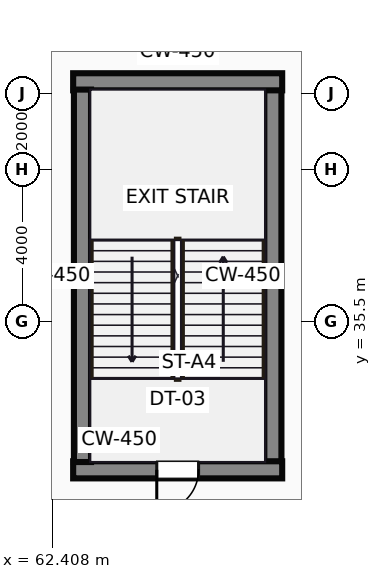
"""IFC4 building model, lengths in metres.
Left out: names, types, materials, properties, quantities, classifications, styles, units other than length and angle.
Written with IfcOpenShell. Run it as: python <this file> out.ifc"""

import sys

from ifc_helpers import new_model, si_unit, direction, frame, frame_2d, origin, place, context, subcontext, project, spatial, rectangle, extrude, source, transform, mapped, element, fill, save


model = new_model("IFC4")
c1 = context("Model", 3, precision=1e-05, world=origin(), true_north=direction((0.0, 1.0)))
c2 = subcontext(c1, "Body", "Model", "MODEL_VIEW")
j1 = project(units=[si_unit("LENGTHUNIT", "METRE"), si_unit("PLANEANGLEUNIT", "RADIAN")], contexts=[c1])
p1 = place(None, origin())
s1 = spatial("IfcSite", under=j1, at=p1, CompositionType="ELEMENT")
p2 = place(p1, origin())
s2 = spatial("IfcBuilding", under=s1, at=p2, CompositionType="ELEMENT")
p3 = place(p2, frame((0.0, 0.0, 11.0)))
s3 = spatial("IfcBuildingStorey", under=s2, at=p3, CompositionType="ELEMENT", Elevation=11.0)
m1 = source(origin(), c2, "Body", "SweptSolid", [
    extrude(rectangle(XDim=5.5, YDim=0.45, at=frame_2d((2.75, 0.0))), origin(), (0.0, 0.0, 1.0), 5.0),
])
p4 = place(p3, frame((62.95, 31.595, 0.0), z_axis=(0.0, 0.0, 1.0), x_axis=(1.0, 0.0, 0.0)))
e1 = element("IfcWall", 1, at=p4, inside=s3, PredefinedType="SHEAR", context=c2, shape_type="MappedRepresentation", body=[
    mapped(m1, transform((0.0, 0.0, 0.0))),
])
p5 = place(p4, frame((2.2, 0.0, 0.0)))
e2 = element("IfcOpeningElement", 2, at=p5, cuts=e1, PredefinedType="OPENING", context=c2, shape_type="SweptSolid", body=[
    extrude(rectangle(XDim=1.1, YDim=2.15, at=frame_2d((0.55, 1.075))), frame((0.0, 0.235, 0.0), z_axis=(0.0, -1.0, 0.0), x_axis=(1.0, 0.0, 0.0)), (0.0, 0.0, 1.0), 0.47),
])
m2 = source(origin(), c2, "Body", "SweptSolid", [
    extrude(rectangle(XDim=9.8, YDim=0.45, at=frame_2d((4.9, 0.0))), origin(), (0.0, 0.0, 1.0), 5.0),
])
for number, where, z_axis, x_axis in (
    (3, (63.195, 31.8, 0.0), (0.0, 0.0, 1.0), (0.0, 1.0, 0.0)),
    (4, (68.205, 31.8, 0.0), (0.0, 0.0, 1.0), (0.0, 1.0, 0.0)),
):
    element("IfcWall", number, at=place(p3, frame(where, z_axis=z_axis, x_axis=x_axis)), inside=s3, PredefinedType="SHEAR", context=c2, shape_type="MappedRepresentation", body=[
        mapped(m2, transform((0.0, 0.0, 0.0))),
    ])
p6 = place(p3, frame((62.95, 41.805, 0.0), z_axis=(0.0, 0.0, 1.0), x_axis=(1.0, 0.0, 0.0)))
e5 = element("IfcWall", 5, at=p6, inside=s3, PredefinedType="SHEAR", context=c2, shape_type="MappedRepresentation", body=[
    mapped(m1, transform((0.0, 0.0, 0.0))),
])
m3 = source(origin(), c2, "Body", "SweptSolid", [
    extrude(rectangle(XDim=1.1, YDim=2.15, at=frame_2d((0.55, 1.075))), frame((0.0, 0.025, 0.0), z_axis=(0.0, -1.0, 0.0), x_axis=(1.0, 0.0, 0.0)), (0.0, 0.0, 1.0), 0.05),
])
p7 = place(p5, origin())
e6 = element("IfcDoor", 6, at=p7, inside=s3, OperationType="SINGLE_SWING_LEFT", PredefinedType="DOOR", context=c2, shape_type="MappedRepresentation", body=[
    mapped(m3, transform((0.0, 0.0, 0.0))),
])
fill(e2, e6)
save(model, sys.argv[1])
